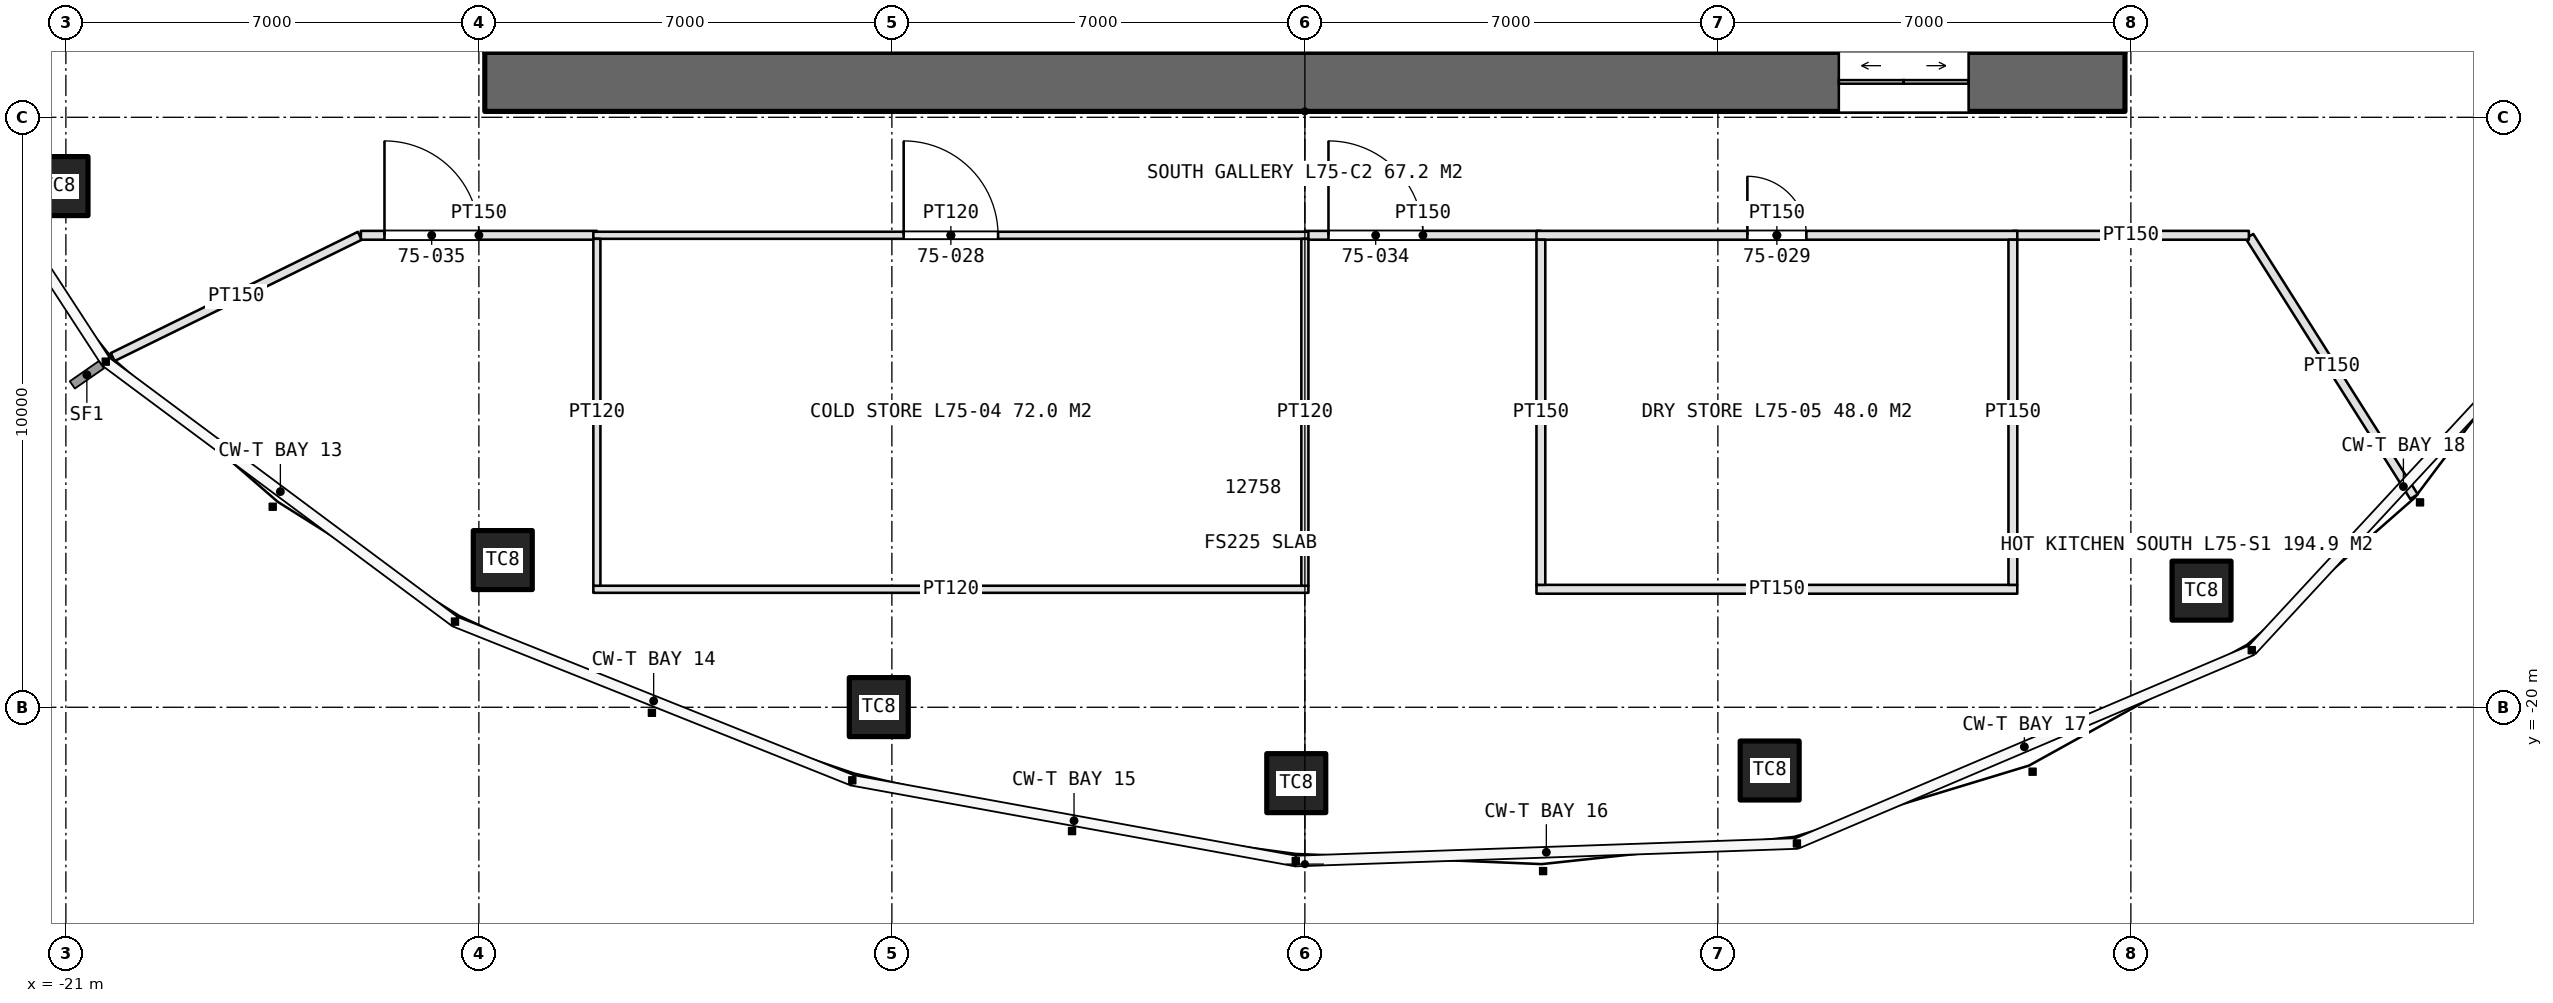
"""IFC4 building model, lengths in metres.
Left out: names, types, materials, properties, quantities, classifications, styles, units other than length and angle.
Written with IfcOpenShell. Run it as: python <this file> out.ifc"""

import sys

from ifc_helpers import new_model, si_unit, direction, frame, frame_2d, origin, origin_2d, place, context, subcontext, project, spatial, rectangle, extrude, element, fill, save


model = new_model("IFC4")
c1 = context("Model", 3, precision=1e-05, world=origin(), true_north=direction((0.0, 1.0)))
c2 = subcontext(c1, "Body", "Model", "MODEL_VIEW")
j1 = project(units=[si_unit("LENGTHUNIT", "METRE"), si_unit("PLANEANGLEUNIT", "RADIAN")], contexts=[c1])
p1 = place(None, origin())
s1 = spatial("IfcSite", under=j1, at=p1, CompositionType="ELEMENT")
p2 = place(p1, origin())
s2 = spatial("IfcBuilding", under=s1, at=p2, CompositionType="ELEMENT")
p3 = place(p2, frame((0.0, 0.0, 334.2)))
s3 = spatial("IfcBuildingStorey", under=s2, at=p3, CompositionType="ELEMENT", Elevation=334.2)
p4 = place(p3, frame((-13.9, -9.4, 0.0), z_axis=(0.0, 0.0, 1.0), x_axis=(1.0, 0.0, 0.0)))
e1 = element("IfcWall", 1, at=p4, inside=s3, PredefinedType="SHEAR", context=c2, shape_type="SweptSolid", body=[
    extrude(rectangle(XDim=27.8, YDim=1.0, at=frame_2d((13.9, 0.0))), origin(), (0.0, 0.0, 1.0), 5.0),
])
p5 = place(p4, frame((22.95, 0.0, 0.0)))
e2 = element("IfcOpeningElement", 2, at=p5, cuts=e1, PredefinedType="OPENING", context=c2, shape_type="SweptSolid", body=[
    extrude(rectangle(XDim=2.2, YDim=2.7, at=frame_2d((1.1, 1.35))), frame((0.0, 0.51, 0.0), z_axis=(0.0, -1.0, 0.0), x_axis=(1.0, 0.0, 0.0)), (0.0, 0.0, 1.0), 1.02),
])
for number, where, z_axis, x_axis in (
    (3, (-21.125, -11.166, 0.0), (0.0, 0.0, 1.0), (1.0, 0.0, 0.0)),
    (4, (-13.595, -17.505, 0.0), (0.0, 0.0, 1.0), (1.0, 0.0, 0.0)),
    (5, (-7.222, -19.997, 0.0), (0.0, 0.0, 1.0), (1.0, 0.0, 0.0)),
    (6, (-0.146, -21.286, 0.0), (0.0, 0.0, 1.0), (1.0, 0.0, 0.0)),
    (7, (7.878, -21.072, 0.0), (0.0, 0.0, 1.0), (1.0, 0.0, 0.0)),
    (8, (15.198, -18.023, 0.0), (0.0, 0.0, 1.0), (1.0, 0.0, 0.0)),
):
    element("IfcColumn", number, at=place(p3, frame(where, z_axis=z_axis, x_axis=x_axis)), inside=s3, PredefinedType="COLUMN", context=c2, shape_type="SweptSolid", body=[
        extrude(rectangle(XDim=1.0, YDim=1.0, at=origin_2d()), origin(), (0.0, 0.0, 1.0), 5.0),
    ])
for number, where, z_axis, x_axis in (
    (9, (-4.2, -4.7, 0.0), (0.0, 0.0, 1.0), (0.0, -1.0, 0.0)),
    (10, (-1.4, -4.7, 0.0), (0.0, 0.0, 1.0), (0.0, -1.0, 0.0)),
    (11, (1.4, -4.7, 0.0), (0.0, 0.0, 1.0), (0.0, -1.0, 0.0)),
    (12, (4.2, -4.7, 0.0), (0.0, 0.0, 1.0), (0.0, -1.0, 0.0)),
):
    element("IfcWall", number, at=place(p3, frame(where, z_axis=z_axis, x_axis=x_axis)), inside=s3, PredefinedType="PARTITIONING", context=c2, shape_type="SweptSolid", body=[
        extrude(rectangle(XDim=4.2, YDim=0.2, at=frame_2d((2.1, 0.0))), origin(), (0.0, 0.0, 1.0), 5.0),
    ])
p6 = place(p3, frame((-16.018, -12.009, 0.0), z_axis=(0.0, 0.0, 1.0), x_axis=(-0.897771840996, -0.440460805879, 0.0)))
e13 = element("IfcWall", 13, at=p6, inside=s3, PredefinedType="PARTITIONING", context=c2, shape_type="SweptSolid", body=[
    extrude(rectangle(XDim=4.666, YDim=0.15, at=frame_2d((2.333, 0.0))), origin(), (0.0, 0.0, 1.0), 3.4),
])
p7 = place(p3, frame((16.011, -12.017, 0.0), z_axis=(0.0, 0.0, 1.0), x_axis=(0.53415837449, -0.845384427916, 0.0)))
e14 = element("IfcWall", 14, at=p7, inside=s3, PredefinedType="PARTITIONING", context=c2, shape_type="SweptSolid", body=[
    extrude(rectangle(XDim=5.22, YDim=0.15, at=frame_2d((2.61, 0.0))), origin(), (0.0, 0.0, 1.0), 3.4),
])
p8 = place(p3, frame((-16.0, -12.0, 0.0), z_axis=(0.0, 0.0, 1.0), x_axis=(1.0, 0.0, 0.0)))
e15 = element("IfcWall", 15, at=p8, inside=s3, PredefinedType="PARTITIONING", context=c2, shape_type="SweptSolid", body=[
    extrude(rectangle(XDim=4.0, YDim=0.15, at=frame_2d((2.0, 0.0))), origin(), (0.0, 0.0, 1.0), 3.4),
])
p9 = place(p8, frame((0.4, 0.0, 0.0)))
e16 = element("IfcOpeningElement", 16, at=p9, cuts=e15, PredefinedType="OPENING", context=c2, shape_type="SweptSolid", body=[
    extrude(rectangle(XDim=1.6, YDim=2.4, at=frame_2d((0.8, 1.2))), frame((0.0, 0.085, 0.0), z_axis=(0.0, -1.0, 0.0), x_axis=(1.0, 0.0, 0.0)), (0.0, 0.0, 1.0), 0.17),
])
p10 = place(p3, frame((0.0, -12.0, 0.0), z_axis=(0.0, 0.0, 1.0), x_axis=(1.0, 0.0, 0.0)))
e17 = element("IfcWall", 17, at=p10, inside=s3, PredefinedType="PARTITIONING", context=c2, shape_type="SweptSolid", body=[
    extrude(rectangle(XDim=4.0, YDim=0.15, at=frame_2d((2.0, 0.0))), origin(), (0.0, 0.0, 1.0), 3.4),
])
p11 = place(p10, frame((0.4, 0.0, 0.0)))
e18 = element("IfcOpeningElement", 18, at=p11, cuts=e17, PredefinedType="OPENING", context=c2, shape_type="SweptSolid", body=[
    extrude(rectangle(XDim=1.6, YDim=2.4, at=frame_2d((0.8, 1.2))), frame((0.0, 0.085, 0.0), z_axis=(0.0, -1.0, 0.0), x_axis=(1.0, 0.0, 0.0)), (0.0, 0.0, 1.0), 0.17),
])
p12 = place(p3, frame((12.0, -12.0, 0.0), z_axis=(0.0, 0.0, 1.0), x_axis=(1.0, 0.0, 0.0)))
e19 = element("IfcWall", 19, at=p12, inside=s3, PredefinedType="PARTITIONING", context=c2, shape_type="SweptSolid", body=[
    extrude(rectangle(XDim=4.0, YDim=0.15, at=frame_2d((2.0, 0.0))), origin(), (0.0, 0.0, 1.0), 3.4),
])
p13 = place(p3, frame((-12.06, -18.0, 0.0), z_axis=(0.0, 0.0, 1.0), x_axis=(1.0, 0.0, 0.0)))
e20 = element("IfcWall", 20, at=p13, inside=s3, PredefinedType="PARTITIONING", context=c2, shape_type="SweptSolid", body=[
    extrude(rectangle(XDim=12.12, YDim=0.12, at=frame_2d((6.06, 0.0))), origin(), (0.0, 0.0, 1.0), 3.4),
])
p14 = place(p3, frame((-12.06, -12.0, 0.0), z_axis=(0.0, 0.0, 1.0), x_axis=(1.0, 0.0, 0.0)))
e21 = element("IfcWall", 21, at=p14, inside=s3, PredefinedType="PARTITIONING", context=c2, shape_type="SweptSolid", body=[
    extrude(rectangle(XDim=12.12, YDim=0.12, at=frame_2d((6.06, 0.0))), origin(), (0.0, 0.0, 1.0), 3.4),
])
p15 = place(p14, frame((5.26, 0.0, 0.0)))
e22 = element("IfcOpeningElement", 22, at=p15, cuts=e21, PredefinedType="OPENING", context=c2, shape_type="SweptSolid", body=[
    extrude(rectangle(XDim=1.6, YDim=2.4, at=frame_2d((0.8, 1.2))), frame((0.0, 0.07, 0.0), z_axis=(0.0, -1.0, 0.0), x_axis=(1.0, 0.0, 0.0)), (0.0, 0.0, 1.0), 0.14),
])
for number, where, z_axis, x_axis in (
    (23, (-12.0, -17.94, 0.0), (0.0, 0.0, 1.0), (0.0, 1.0, 0.0)),
    (24, (0.0, -17.94, 0.0), (0.0, 0.0, 1.0), (0.0, 1.0, 0.0)),
):
    element("IfcWall", number, at=place(p3, frame(where, z_axis=z_axis, x_axis=x_axis)), inside=s3, PredefinedType="PARTITIONING", context=c2, shape_type="SweptSolid", body=[
        extrude(rectangle(XDim=5.88, YDim=0.12, at=frame_2d((2.94, 0.0))), origin(), (0.0, 0.0, 1.0), 3.4),
    ])
p16 = place(p3, frame((3.925, -18.0, 0.0), z_axis=(0.0, 0.0, 1.0), x_axis=(1.0, 0.0, 0.0)))
e25 = element("IfcWall", 25, at=p16, inside=s3, PredefinedType="PARTITIONING", context=c2, shape_type="SweptSolid", body=[
    extrude(rectangle(XDim=8.15, YDim=0.15, at=frame_2d((4.075, 0.0))), origin(), (0.0, 0.0, 1.0), 3.4),
])
p17 = place(p3, frame((3.925, -12.0, 0.0), z_axis=(0.0, 0.0, 1.0), x_axis=(1.0, 0.0, 0.0)))
e26 = element("IfcWall", 26, at=p17, inside=s3, PredefinedType="PARTITIONING", context=c2, shape_type="SweptSolid", body=[
    extrude(rectangle(XDim=8.15, YDim=0.15, at=frame_2d((4.075, 0.0))), origin(), (0.0, 0.0, 1.0), 3.4),
])
p18 = place(p17, frame((3.575, 0.0, 0.0)))
e27 = element("IfcOpeningElement", 27, at=p18, cuts=e26, PredefinedType="OPENING", context=c2, shape_type="SweptSolid", body=[
    extrude(rectangle(XDim=1.0, YDim=2.2, at=frame_2d((0.5, 1.1))), frame((0.0, 0.085, 0.0), z_axis=(0.0, -1.0, 0.0), x_axis=(1.0, 0.0, 0.0)), (0.0, 0.0, 1.0), 0.17),
])
for number, where, z_axis, x_axis in (
    (28, (4.0, -17.925, 0.0), (0.0, 0.0, 1.0), (0.0, 1.0, 0.0)),
    (29, (12.0, -17.925, 0.0), (0.0, 0.0, 1.0), (0.0, 1.0, 0.0)),
):
    element("IfcWall", number, at=place(p3, frame(where, z_axis=z_axis, x_axis=x_axis)), inside=s3, PredefinedType="PARTITIONING", context=c2, shape_type="SweptSolid", body=[
        extrude(rectangle(XDim=5.85, YDim=0.15, at=frame_2d((2.925, 0.0))), origin(), (0.0, 0.0, 1.0), 3.4),
    ])
p19 = place(p5, origin())
e30 = element("IfcDoor", 30, at=p19, inside=s3, OperationType="DOUBLE_DOOR_SLIDING", PredefinedType="DOOR", context=c2, shape_type="SweptSolid", body=[
    extrude(rectangle(XDim=2.2, YDim=2.7, at=frame_2d((1.1, 1.35))), frame((0.0, 0.025, 0.0), z_axis=(0.0, -1.0, 0.0), x_axis=(1.0, 0.0, 0.0)), (0.0, 0.0, 1.0), 0.05),
])
fill(e2, e30)
p20 = place(p15, origin())
e31 = element("IfcDoor", 31, at=p20, inside=s3, OperationType="DOUBLE_DOOR_SINGLE_SWING", PredefinedType="DOOR", context=c2, shape_type="SweptSolid", body=[
    extrude(rectangle(XDim=1.6, YDim=2.4, at=frame_2d((0.8, 1.2))), frame((0.0, 0.025, 0.0), z_axis=(0.0, -1.0, 0.0), x_axis=(1.0, 0.0, 0.0)), (0.0, 0.0, 1.0), 0.05),
])
fill(e22, e31)
p21 = place(p18, origin())
e32 = element("IfcDoor", 32, at=p21, inside=s3, OperationType="SINGLE_SWING_LEFT", PredefinedType="DOOR", context=c2, shape_type="SweptSolid", body=[
    extrude(rectangle(XDim=1.0, YDim=2.2, at=frame_2d((0.5, 1.1))), frame((0.0, 0.025, 0.0), z_axis=(0.0, -1.0, 0.0), x_axis=(1.0, 0.0, 0.0)), (0.0, 0.0, 1.0), 0.05),
])
fill(e27, e32)
p22 = place(p11, origin())
e33 = element("IfcDoor", 33, at=p22, inside=s3, OperationType="DOUBLE_DOOR_SINGLE_SWING", PredefinedType="DOOR", context=c2, shape_type="SweptSolid", body=[
    extrude(rectangle(XDim=1.6, YDim=2.4, at=frame_2d((0.8, 1.2))), frame((0.0, 0.025, 0.0), z_axis=(0.0, -1.0, 0.0), x_axis=(1.0, 0.0, 0.0)), (0.0, 0.0, 1.0), 0.05),
])
fill(e18, e33)
p23 = place(p9, origin())
e34 = element("IfcDoor", 34, at=p23, inside=s3, OperationType="DOUBLE_DOOR_SINGLE_SWING", PredefinedType="DOOR", context=c2, shape_type="SweptSolid", body=[
    extrude(rectangle(XDim=1.6, YDim=2.4, at=frame_2d((0.8, 1.2))), frame((0.0, 0.025, 0.0), z_axis=(0.0, -1.0, 0.0), x_axis=(1.0, 0.0, 0.0)), (0.0, 0.0, 1.0), 0.05),
])
fill(e16, e34)
save(model, sys.argv[1])
